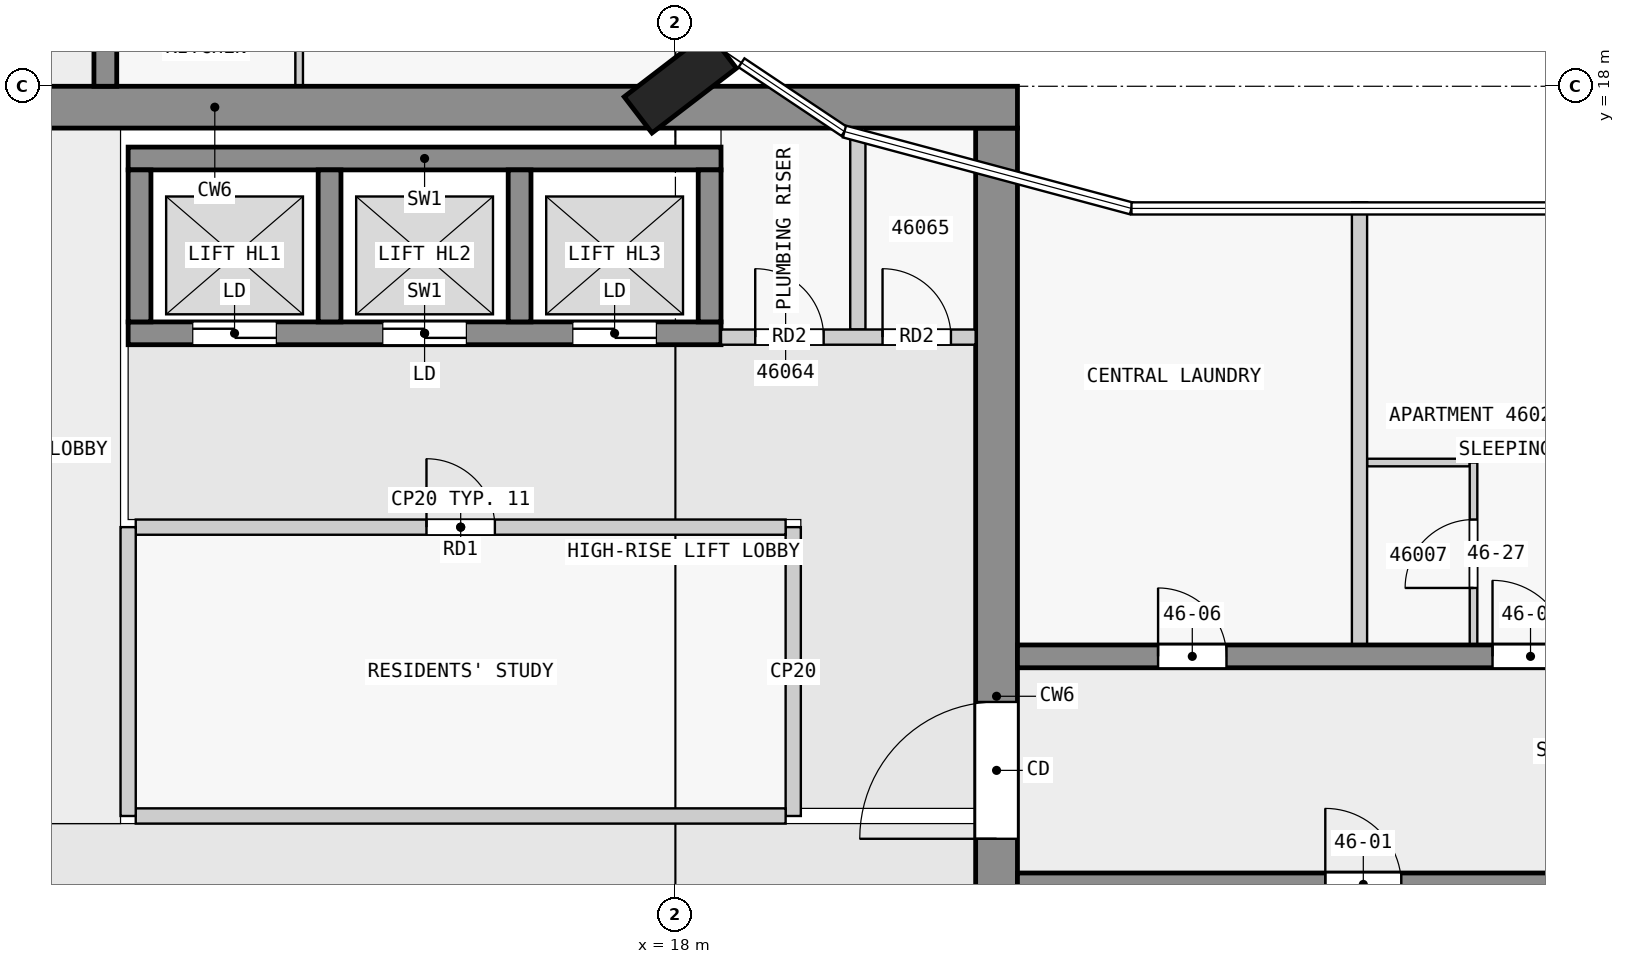
"""IFC4 building model, lengths in metres.
Left out: names, types, materials, properties, quantities, classifications, styles, units other than length and angle.
Written with IfcOpenShell. Run it as: python <this file> out.ifc"""

import sys

from ifc_helpers import new_model, si_unit, direction, frame, frame_2d, origin, origin_2d, place, context, subcontext, project, spatial, rectangle, extrude, element, fill, save


model = new_model("IFC4")
c1 = context("Model", 3, precision=1e-05, world=origin(), true_north=direction((0.0, 1.0)))
c2 = subcontext(c1, "Body", "Model", "MODEL_VIEW")
j1 = project(units=[si_unit("LENGTHUNIT", "METRE"), si_unit("PLANEANGLEUNIT", "RADIAN")], contexts=[c1])
p1 = place(None, origin())
s1 = spatial("IfcSite", under=j1, at=p1, CompositionType="ELEMENT")
p2 = place(p1, origin())
s2 = spatial("IfcBuilding", under=s1, at=p2, CompositionType="ELEMENT")
p3 = place(p2, frame((0.0, 0.0, 177.9)))
s3 = spatial("IfcBuildingStorey", under=s2, at=p3, CompositionType="ELEMENT", Elevation=177.9)
p4 = place(p3, frame((18.065, 18.05, 0.0), z_axis=(0.0, 0.0, 1.0), x_axis=(-0.608810846443, 0.793315418515, 0.0)))
e1 = element("IfcColumn", 1, at=p4, inside=s3, PredefinedType="COLUMN", context=c2, shape_type="SweptSolid", body=[
    extrude(rectangle(XDim=0.6, YDim=1.4, at=origin_2d()), origin(), (0.0, 0.0, 1.0), 3.5),
])
p5 = place(p3, frame((1.38, 17.725, 0.0), z_axis=(0.0, 0.0, 1.0), x_axis=(1.0, 0.0, 0.0)))
e2 = element("IfcWall", 2, at=p5, inside=s3, PredefinedType="SHEAR", context=c2, shape_type="SweptSolid", body=[
    extrude(rectangle(XDim=21.12, YDim=0.55, at=frame_2d((10.56, 0.0))), origin(), (0.0, 0.0, 1.0), 3.25),
])
p6 = place(p5, frame((6.35, 0.0, 0.0)))
e3 = element("IfcOpeningElement", 3, at=p6, cuts=e2, PredefinedType="OPENING", context=c2, shape_type="SweptSolid", body=[
    extrude(rectangle(XDim=1.8, YDim=2.1, at=frame_2d((0.9, 1.05))), frame((0.0, 0.285, 0.0), z_axis=(0.0, -1.0, 0.0), x_axis=(1.0, 0.0, 0.0)), (0.0, 0.0, 1.0), 0.57),
])
p7 = place(p3, frame((22.225, 2.5, 0.0), z_axis=(0.0, 0.0, 1.0), x_axis=(0.0, 1.0, 0.0)))
e4 = element("IfcWall", 4, at=p7, inside=s3, PredefinedType="SHEAR", context=c2, shape_type="SweptSolid", body=[
    extrude(rectangle(XDim=14.95, YDim=0.55, at=frame_2d((7.475, 0.0))), origin(), (0.0, 0.0, 1.0), 3.25),
])
p8 = place(p7, frame((5.6, 0.0, 0.0)))
e5 = element("IfcOpeningElement", 5, at=p8, cuts=e4, PredefinedType="OPENING", context=c2, shape_type="SweptSolid", body=[
    extrude(rectangle(XDim=1.8, YDim=2.1, at=frame_2d((0.9, 1.05))), frame((0.0, 0.285, 0.0), z_axis=(0.0, -1.0, 0.0), x_axis=(1.0, 0.0, 0.0)), (0.0, 0.0, 1.0), 0.57),
])
p9 = place(p3, frame((10.8, 17.05, 0.0), z_axis=(0.0, 0.0, 1.0), x_axis=(1.0, 0.0, 0.0)))
e6 = element("IfcWall", 6, at=p9, inside=s3, PredefinedType="SHEAR", context=c2, shape_type="SweptSolid", body=[
    extrude(rectangle(XDim=7.8, YDim=0.3, at=frame_2d((3.9, 0.0))), origin(), (0.0, 0.0, 1.0), 3.25),
])
p10 = place(p3, frame((10.8, 14.75, 0.0), z_axis=(0.0, 0.0, 1.0), x_axis=(1.0, 0.0, 0.0)))
e7 = element("IfcWall", 7, at=p10, inside=s3, PredefinedType="SHEAR", context=c2, shape_type="SweptSolid", body=[
    extrude(rectangle(XDim=7.8, YDim=0.3, at=frame_2d((3.9, 0.0))), origin(), (0.0, 0.0, 1.0), 3.25),
])
p11 = place(p10, frame((0.85, 0.0, 0.0)))
e8 = element("IfcOpeningElement", 8, at=p11, cuts=e7, PredefinedType="OPENING", context=c2, shape_type="SweptSolid", body=[
    extrude(rectangle(XDim=1.1, YDim=2.1, at=frame_2d((0.55, 1.05))), frame((0.0, 0.16, 0.0), z_axis=(0.0, -1.0, 0.0), x_axis=(1.0, 0.0, 0.0)), (0.0, 0.0, 1.0), 0.32),
])
p12 = place(p10, frame((3.35, 0.0, 0.0)))
e9 = element("IfcOpeningElement", 9, at=p12, cuts=e7, PredefinedType="OPENING", context=c2, shape_type="SweptSolid", body=[
    extrude(rectangle(XDim=1.1, YDim=2.1, at=frame_2d((0.55, 1.05))), frame((0.0, 0.16, 0.0), z_axis=(0.0, -1.0, 0.0), x_axis=(1.0, 0.0, 0.0)), (0.0, 0.0, 1.0), 0.32),
])
p13 = place(p10, frame((5.85, 0.0, 0.0)))
e10 = element("IfcOpeningElement", 10, at=p13, cuts=e7, PredefinedType="OPENING", context=c2, shape_type="SweptSolid", body=[
    extrude(rectangle(XDim=1.1, YDim=2.1, at=frame_2d((0.55, 1.05))), frame((0.0, 0.16, 0.0), z_axis=(0.0, -1.0, 0.0), x_axis=(1.0, 0.0, 0.0)), (0.0, 0.0, 1.0), 0.32),
])
for number, where, z_axis, x_axis in (
    (11, (10.95, 14.9, 0.0), (0.0, 0.0, 1.0), (0.0, 1.0, 0.0)),
    (12, (13.45, 14.9, 0.0), (0.0, 0.0, 1.0), (0.0, 1.0, 0.0)),
    (13, (15.95, 14.9, 0.0), (0.0, 0.0, 1.0), (0.0, 1.0, 0.0)),
    (14, (18.45, 14.9, 0.0), (0.0, 0.0, 1.0), (0.0, 1.0, 0.0)),
):
    element("IfcWall", number, at=place(p3, frame(where, z_axis=z_axis, x_axis=x_axis)), inside=s3, PredefinedType="SHEAR", context=c2, shape_type="SweptSolid", body=[
        extrude(rectangle(XDim=2.0, YDim=0.3, at=frame_2d((1.0, 0.0))), origin(), (0.0, 0.0, 1.0), 3.25),
    ])
p14 = place(p3, frame((22.5, 7.5, 0.0), z_axis=(0.0, 0.0, 1.0), x_axis=(1.0, 0.0, 0.0)))
e15 = element("IfcWall", 15, at=p14, inside=s3, PredefinedType="SHEAR", context=c2, shape_type="SweptSolid", body=[
    extrude(rectangle(XDim=22.5, YDim=0.3, at=frame_2d((11.25, 0.0))), origin(), (0.0, 0.0, 1.0), 3.25),
])
p15 = place(p14, frame((4.05, 0.0, 0.0)))
e16 = element("IfcOpeningElement", 16, at=p15, cuts=e15, PredefinedType="OPENING", context=c2, shape_type="SweptSolid", body=[
    extrude(rectangle(XDim=1.0, YDim=2.1, at=frame_2d((0.5, 1.05))), frame((0.0, 0.16, 0.0), z_axis=(0.0, -1.0, 0.0), x_axis=(1.0, 0.0, 0.0)), (0.0, 0.0, 1.0), 0.32),
])
p16 = place(p14, frame((10.75, 0.0, 0.0)))
e17 = element("IfcOpeningElement", 17, at=p16, cuts=e15, PredefinedType="OPENING", context=c2, shape_type="SweptSolid", body=[
    extrude(rectangle(XDim=1.0, YDim=2.1, at=frame_2d((0.5, 1.05))), frame((0.0, 0.16, 0.0), z_axis=(0.0, -1.0, 0.0), x_axis=(1.0, 0.0, 0.0)), (0.0, 0.0, 1.0), 0.32),
])
p17 = place(p14, frame((15.35, 0.0, 0.0)))
e18 = element("IfcOpeningElement", 18, at=p17, cuts=e15, PredefinedType="OPENING", context=c2, shape_type="SweptSolid", body=[
    extrude(rectangle(XDim=0.9, YDim=2.1, at=frame_2d((0.45, 1.05))), frame((0.0, 0.16, 0.0), z_axis=(0.0, -1.0, 0.0), x_axis=(1.0, 0.0, 0.0)), (0.0, 0.0, 1.0), 0.32),
])
p18 = place(p14, frame((18.75, 0.0, 0.0)))
e19 = element("IfcOpeningElement", 19, at=p18, cuts=e15, PredefinedType="OPENING", context=c2, shape_type="SweptSolid", body=[
    extrude(rectangle(XDim=0.9, YDim=2.1, at=frame_2d((0.45, 1.05))), frame((0.0, 0.16, 0.0), z_axis=(0.0, -1.0, 0.0), x_axis=(1.0, 0.0, 0.0)), (0.0, 0.0, 1.0), 0.32),
])
p19 = place(p14, frame((20.95, 0.0, 0.0)))
e20 = element("IfcOpeningElement", 20, at=p19, cuts=e15, PredefinedType="OPENING", context=c2, shape_type="SweptSolid", body=[
    extrude(rectangle(XDim=1.0, YDim=2.1, at=frame_2d((0.5, 1.05))), frame((0.0, 0.16, 0.0), z_axis=(0.0, -1.0, 0.0), x_axis=(1.0, 0.0, 0.0)), (0.0, 0.0, 1.0), 0.32),
])
p20 = place(p3, frame((22.5, 10.5, 0.0), z_axis=(0.0, 0.0, 1.0), x_axis=(1.0, 0.0, 0.0)))
e21 = element("IfcWall", 21, at=p20, inside=s3, PredefinedType="SHEAR", context=c2, shape_type="SweptSolid", body=[
    extrude(rectangle(XDim=22.5, YDim=0.3, at=frame_2d((11.25, 0.0))), origin(), (0.0, 0.0, 1.0), 3.25),
])
p21 = place(p20, frame((1.85, 0.0, 0.0)))
e22 = element("IfcOpeningElement", 22, at=p21, cuts=e21, PredefinedType="OPENING", context=c2, shape_type="SweptSolid", body=[
    extrude(rectangle(XDim=0.9, YDim=2.1, at=frame_2d((0.45, 1.05))), frame((0.0, 0.16, 0.0), z_axis=(0.0, -1.0, 0.0), x_axis=(1.0, 0.0, 0.0)), (0.0, 0.0, 1.0), 0.32),
])
p22 = place(p20, frame((6.25, 0.0, 0.0)))
e23 = element("IfcOpeningElement", 23, at=p22, cuts=e21, PredefinedType="OPENING", context=c2, shape_type="SweptSolid", body=[
    extrude(rectangle(XDim=1.0, YDim=2.1, at=frame_2d((0.5, 1.05))), frame((0.0, 0.16, 0.0), z_axis=(0.0, -1.0, 0.0), x_axis=(1.0, 0.0, 0.0)), (0.0, 0.0, 1.0), 0.32),
])
p23 = place(p20, frame((10.35, 0.0, 0.0)))
e24 = element("IfcOpeningElement", 24, at=p23, cuts=e21, PredefinedType="OPENING", context=c2, shape_type="SweptSolid", body=[
    extrude(rectangle(XDim=1.8, YDim=2.1, at=frame_2d((0.9, 1.05))), frame((0.0, 0.16, 0.0), z_axis=(0.0, -1.0, 0.0), x_axis=(1.0, 0.0, 0.0)), (0.0, 0.0, 1.0), 0.32),
])
p24 = place(p20, frame((16.85, 0.0, 0.0)))
e25 = element("IfcOpeningElement", 25, at=p24, cuts=e21, PredefinedType="OPENING", context=c2, shape_type="SweptSolid", body=[
    extrude(rectangle(XDim=1.0, YDim=2.1, at=frame_2d((0.5, 1.05))), frame((0.0, 0.16, 0.0), z_axis=(0.0, -1.0, 0.0), x_axis=(1.0, 0.0, 0.0)), (0.0, 0.0, 1.0), 0.32),
])
p25 = place(p3, frame((10.5, 18.0, 0.0), z_axis=(0.0, 0.0, 1.0), x_axis=(0.0, 1.0, 0.0)))
e26 = element("IfcWall", 26, at=p25, inside=s3, PredefinedType="SHEAR", context=c2, shape_type="SweptSolid", body=[
    extrude(rectangle(XDim=27.0, YDim=0.3, at=frame_2d((13.5, 0.0))), origin(), (0.0, 0.0, 1.0), 3.25),
])
p26 = place(p25, frame((1.75, 0.0, 0.0)))
e27 = element("IfcOpeningElement", 27, at=p26, cuts=e26, PredefinedType="OPENING", context=c2, shape_type="SweptSolid", body=[
    extrude(rectangle(XDim=1.0, YDim=2.1, at=frame_2d((0.5, 1.05))), frame((0.0, 0.16, 0.0), z_axis=(0.0, -1.0, 0.0), x_axis=(1.0, 0.0, 0.0)), (0.0, 0.0, 1.0), 0.32),
])
p27 = place(p25, frame((6.25, 0.0, 0.0)))
e28 = element("IfcOpeningElement", 28, at=p27, cuts=e26, PredefinedType="OPENING", context=c2, shape_type="SweptSolid", body=[
    extrude(rectangle(XDim=1.0, YDim=2.1, at=frame_2d((0.5, 1.05))), frame((0.0, 0.16, 0.0), z_axis=(0.0, -1.0, 0.0), x_axis=(1.0, 0.0, 0.0)), (0.0, 0.0, 1.0), 0.32),
])
p28 = place(p25, frame((10.75, 0.0, 0.0)))
e29 = element("IfcOpeningElement", 29, at=p28, cuts=e26, PredefinedType="OPENING", context=c2, shape_type="SweptSolid", body=[
    extrude(rectangle(XDim=1.0, YDim=2.1, at=frame_2d((0.5, 1.05))), frame((0.0, 0.16, 0.0), z_axis=(0.0, -1.0, 0.0), x_axis=(1.0, 0.0, 0.0)), (0.0, 0.0, 1.0), 0.32),
])
p29 = place(p25, frame((15.25, 0.0, 0.0)))
e30 = element("IfcOpeningElement", 30, at=p29, cuts=e26, PredefinedType="OPENING", context=c2, shape_type="SweptSolid", body=[
    extrude(rectangle(XDim=1.0, YDim=2.1, at=frame_2d((0.5, 1.05))), frame((0.0, 0.16, 0.0), z_axis=(0.0, -1.0, 0.0), x_axis=(1.0, 0.0, 0.0)), (0.0, 0.0, 1.0), 0.32),
])
p30 = place(p25, frame((19.75, 0.0, 0.0)))
e31 = element("IfcOpeningElement", 31, at=p30, cuts=e26, PredefinedType="OPENING", context=c2, shape_type="SweptSolid", body=[
    extrude(rectangle(XDim=1.0, YDim=2.1, at=frame_2d((0.5, 1.05))), frame((0.0, 0.16, 0.0), z_axis=(0.0, -1.0, 0.0), x_axis=(1.0, 0.0, 0.0)), (0.0, 0.0, 1.0), 0.32),
])
p31 = place(p25, frame((23.25, 0.0, 0.0)))
e32 = element("IfcOpeningElement", 32, at=p31, cuts=e26, PredefinedType="OPENING", context=c2, shape_type="SweptSolid", body=[
    extrude(rectangle(XDim=0.9, YDim=2.1, at=frame_2d((0.45, 1.05))), frame((0.0, 0.16, 0.0), z_axis=(0.0, -1.0, 0.0), x_axis=(1.0, 0.0, 0.0)), (0.0, 0.0, 1.0), 0.32),
])
p32 = place(p25, frame((25.45, 0.0, 0.0)))
e33 = element("IfcOpeningElement", 33, at=p32, cuts=e26, PredefinedType="OPENING", context=c2, shape_type="SweptSolid", body=[
    extrude(rectangle(XDim=1.0, YDim=2.1, at=frame_2d((0.5, 1.05))), frame((0.0, 0.16, 0.0), z_axis=(0.0, -1.0, 0.0), x_axis=(1.0, 0.0, 0.0)), (0.0, 0.0, 1.0), 0.32),
])
p33 = place(p3, frame((10.8, 8.4, 0.0), z_axis=(0.0, 0.0, 1.0), x_axis=(0.0, 1.0, 0.0)))
e34 = element("IfcWall", 34, at=p33, inside=s3, PredefinedType="PARTITIONING", context=c2, shape_type="SweptSolid", body=[
    extrude(rectangle(XDim=3.8, YDim=0.2, at=frame_2d((1.9, 0.0))), origin(), (0.0, 0.0, 1.0), 3.25),
])
p34 = place(p3, frame((10.9, 8.4, 0.0), z_axis=(0.0, 0.0, 1.0), x_axis=(1.0, 0.0, 0.0)))
e35 = element("IfcWall", 35, at=p34, inside=s3, PredefinedType="PARTITIONING", context=c2, shape_type="SweptSolid", body=[
    extrude(rectangle(XDim=8.55, YDim=0.2, at=frame_2d((4.275, 0.0))), origin(), (0.0, 0.0, 1.0), 3.25),
])
p35 = place(p3, frame((19.55, 8.4, 0.0), z_axis=(0.0, 0.0, 1.0), x_axis=(0.0, 1.0, 0.0)))
e36 = element("IfcWall", 36, at=p35, inside=s3, PredefinedType="PARTITIONING", context=c2, shape_type="SweptSolid", body=[
    extrude(rectangle(XDim=3.8, YDim=0.2, at=frame_2d((1.9, 0.0))), origin(), (0.0, 0.0, 1.0), 3.25),
])
p36 = place(p3, frame((10.9, 12.2, 0.0), z_axis=(0.0, 0.0, 1.0), x_axis=(1.0, 0.0, 0.0)))
e37 = element("IfcWall", 37, at=p36, inside=s3, PredefinedType="PARTITIONING", context=c2, shape_type="SweptSolid", body=[
    extrude(rectangle(XDim=8.55, YDim=0.2, at=frame_2d((4.275, 0.0))), origin(), (0.0, 0.0, 1.0), 3.25),
])
p37 = place(p36, frame((3.825, 0.0, 0.0)))
e38 = element("IfcOpeningElement", 38, at=p37, cuts=e37, PredefinedType="OPENING", context=c2, shape_type="SweptSolid", body=[
    extrude(rectangle(XDim=0.9, YDim=2.1, at=frame_2d((0.45, 1.05))), frame((0.0, 0.11, 0.0), z_axis=(0.0, -1.0, 0.0), x_axis=(1.0, 0.0, 0.0)), (0.0, 0.0, 1.0), 0.22),
])
p38 = place(p3, frame((18.6, 14.7, 0.0), z_axis=(0.0, 0.0, 1.0), x_axis=(1.0, 0.0, 0.0)))
e39 = element("IfcWall", 39, at=p38, inside=s3, PredefinedType="PARTITIONING", context=c2, shape_type="SweptSolid", body=[
    extrude(rectangle(XDim=3.35, YDim=0.2, at=frame_2d((1.675, 0.0))), origin(), (0.0, 0.0, 1.0), 3.25),
])
p39 = place(p38, frame((0.45, 0.0, 0.0)))
e40 = element("IfcOpeningElement", 40, at=p39, cuts=e39, PredefinedType="OPENING", context=c2, shape_type="SweptSolid", body=[
    extrude(rectangle(XDim=0.9, YDim=2.1, at=frame_2d((0.45, 1.05))), frame((0.0, 0.11, 0.0), z_axis=(0.0, -1.0, 0.0), x_axis=(1.0, 0.0, 0.0)), (0.0, 0.0, 1.0), 0.22),
])
p40 = place(p38, frame((2.125, 0.0, 0.0)))
e41 = element("IfcOpeningElement", 41, at=p40, cuts=e39, PredefinedType="OPENING", context=c2, shape_type="SweptSolid", body=[
    extrude(rectangle(XDim=0.9, YDim=2.1, at=frame_2d((0.45, 1.05))), frame((0.0, 0.11, 0.0), z_axis=(0.0, -1.0, 0.0), x_axis=(1.0, 0.0, 0.0)), (0.0, 0.0, 1.0), 0.22),
])
p41 = place(p3, frame((20.4, 14.8, 0.0), z_axis=(0.0, 0.0, 1.0), x_axis=(0.0, 1.0, 0.0)))
e42 = element("IfcWall", 42, at=p41, inside=s3, PredefinedType="PARTITIONING", context=c2, shape_type="SweptSolid", body=[
    extrude(rectangle(XDim=2.65, YDim=0.2, at=frame_2d((1.325, 0.0))), origin(), (0.0, 0.0, 1.0), 3.25),
])
p42 = place(p3, frame((28.45, 13.05, 0.0), z_axis=(0.0, 0.0, 1.0), x_axis=(-1.0, 0.0, 0.0)))
e43 = element("IfcWall", 43, at=p42, inside=s3, PredefinedType="PARTITIONING", context=c2, shape_type="SweptSolid", body=[
    extrude(rectangle(XDim=1.35, YDim=0.1, at=frame_2d((0.675, 0.0))), origin(), (0.0, 0.0, 1.0), 3.25),
])
p43 = place(p3, frame((13.05, 18.0, 0.0), z_axis=(0.0, 0.0, 1.0), x_axis=(0.0, 1.0, 0.0)))
e44 = element("IfcWall", 44, at=p43, inside=s3, PredefinedType="PARTITIONING", context=c2, shape_type="SweptSolid", body=[
    extrude(rectangle(XDim=1.45, YDim=0.1, at=frame_2d((0.725, 0.0))), origin(), (0.0, 0.0, 1.0), 3.25),
])
p44 = place(p3, frame((27.0, 10.65, 0.0), z_axis=(0.0, 0.0, 1.0), x_axis=(0.0, 1.0, 0.0)))
e45 = element("IfcWall", 45, at=p44, inside=s3, PredefinedType="PARTITIONING", context=c2, shape_type="SweptSolid", body=[
    extrude(rectangle(XDim=5.823, YDim=0.2, at=frame_2d((2.912, 0.0))), origin(), (0.0, 0.0, 1.0), 3.25),
])
p45 = place(p3, frame((28.5, 10.65, 0.0), z_axis=(0.0, 0.0, 1.0), x_axis=(0.0, 1.0, 0.0)))
e46 = element("IfcWall", 46, at=p45, inside=s3, PredefinedType="PARTITIONING", context=c2, shape_type="SweptSolid", body=[
    extrude(rectangle(XDim=2.4, YDim=0.1, at=frame_2d((1.2, 0.0))), origin(), (0.0, 0.0, 1.0), 3.25),
])
p46 = place(p45, frame((0.75, 0.0, 0.0)))
e47 = element("IfcOpeningElement", 47, at=p46, cuts=e46, PredefinedType="OPENING", context=c2, shape_type="SweptSolid", body=[
    extrude(rectangle(XDim=0.9, YDim=2.1, at=frame_2d((0.45, 1.05))), frame((0.0, 0.06, 0.0), z_axis=(0.0, -1.0, 0.0), x_axis=(1.0, 0.0, 0.0)), (0.0, 0.0, 1.0), 0.12),
])
p47 = place(p37, origin())
e48 = element("IfcDoor", 48, at=p47, inside=s3, OperationType="SINGLE_SWING_LEFT", PredefinedType="DOOR", context=c2, shape_type="SweptSolid", body=[
    extrude(rectangle(XDim=0.9, YDim=2.1, at=frame_2d((0.45, 1.05))), frame((0.0, 0.025, 0.0), z_axis=(0.0, -1.0, 0.0), x_axis=(1.0, 0.0, 0.0)), (0.0, 0.0, 1.0), 0.05),
])
fill(e38, e48)
p48 = place(p11, origin())
e49 = element("IfcDoor", 49, at=p48, inside=s3, OperationType="DOUBLE_DOOR_SLIDING", PredefinedType="DOOR", context=c2, shape_type="SweptSolid", body=[
    extrude(rectangle(XDim=1.1, YDim=2.1, at=frame_2d((0.55, 1.05))), frame((0.0, 0.025, 0.0), z_axis=(0.0, -1.0, 0.0), x_axis=(1.0, 0.0, 0.0)), (0.0, 0.0, 1.0), 0.05),
])
fill(e8, e49)
p49 = place(p12, origin())
e50 = element("IfcDoor", 50, at=p49, inside=s3, OperationType="DOUBLE_DOOR_SLIDING", PredefinedType="DOOR", context=c2, shape_type="SweptSolid", body=[
    extrude(rectangle(XDim=1.1, YDim=2.1, at=frame_2d((0.55, 1.05))), frame((0.0, 0.025, 0.0), z_axis=(0.0, -1.0, 0.0), x_axis=(1.0, 0.0, 0.0)), (0.0, 0.0, 1.0), 0.05),
])
fill(e9, e50)
p50 = place(p13, origin())
e51 = element("IfcDoor", 51, at=p50, inside=s3, OperationType="DOUBLE_DOOR_SLIDING", PredefinedType="DOOR", context=c2, shape_type="SweptSolid", body=[
    extrude(rectangle(XDim=1.1, YDim=2.1, at=frame_2d((0.55, 1.05))), frame((0.0, 0.025, 0.0), z_axis=(0.0, -1.0, 0.0), x_axis=(1.0, 0.0, 0.0)), (0.0, 0.0, 1.0), 0.05),
])
fill(e10, e51)
p51 = place(p8, origin())
e52 = element("IfcDoor", 52, at=p51, inside=s3, OperationType="DOUBLE_DOOR_SINGLE_SWING", PredefinedType="DOOR", context=c2, shape_type="SweptSolid", body=[
    extrude(rectangle(XDim=1.8, YDim=2.1, at=frame_2d((0.9, 1.05))), frame((0.0, 0.025, 0.0), z_axis=(0.0, -1.0, 0.0), x_axis=(1.0, 0.0, 0.0)), (0.0, 0.0, 1.0), 0.05),
])
fill(e5, e52)
p52 = place(p39, origin())
e53 = element("IfcDoor", 53, at=p52, inside=s3, OperationType="SINGLE_SWING_LEFT", PredefinedType="DOOR", context=c2, shape_type="SweptSolid", body=[
    extrude(rectangle(XDim=0.9, YDim=2.1, at=frame_2d((0.45, 1.05))), frame((0.0, 0.025, 0.0), z_axis=(0.0, -1.0, 0.0), x_axis=(1.0, 0.0, 0.0)), (0.0, 0.0, 1.0), 0.05),
])
fill(e40, e53)
p53 = place(p40, origin())
e54 = element("IfcDoor", 54, at=p53, inside=s3, OperationType="SINGLE_SWING_LEFT", PredefinedType="DOOR", context=c2, shape_type="SweptSolid", body=[
    extrude(rectangle(XDim=0.9, YDim=2.1, at=frame_2d((0.45, 1.05))), frame((0.0, 0.025, 0.0), z_axis=(0.0, -1.0, 0.0), x_axis=(1.0, 0.0, 0.0)), (0.0, 0.0, 1.0), 0.05),
])
fill(e41, e54)
p54 = place(p15, origin())
e55 = element("IfcDoor", 55, at=p54, inside=s3, OperationType="SINGLE_SWING_LEFT", PredefinedType="DOOR", context=c2, shape_type="SweptSolid", body=[
    extrude(rectangle(XDim=1.0, YDim=2.1, at=frame_2d((0.5, 1.05))), frame((0.0, 0.025, 0.0), z_axis=(0.0, -1.0, 0.0), x_axis=(1.0, 0.0, 0.0)), (0.0, 0.0, 1.0), 0.05),
])
fill(e16, e55)
p55 = place(p21, origin())
e56 = element("IfcDoor", 56, at=p55, inside=s3, OperationType="SINGLE_SWING_LEFT", PredefinedType="DOOR", context=c2, shape_type="SweptSolid", body=[
    extrude(rectangle(XDim=0.9, YDim=2.1, at=frame_2d((0.45, 1.05))), frame((0.0, 0.025, 0.0), z_axis=(0.0, -1.0, 0.0), x_axis=(1.0, 0.0, 0.0)), (0.0, 0.0, 1.0), 0.05),
])
fill(e22, e56)
p56 = place(p22, origin())
e57 = element("IfcDoor", 57, at=p56, inside=s3, OperationType="SINGLE_SWING_LEFT", PredefinedType="DOOR", context=c2, shape_type="SweptSolid", body=[
    extrude(rectangle(XDim=1.0, YDim=2.1, at=frame_2d((0.5, 1.05))), frame((0.0, 0.025, 0.0), z_axis=(0.0, -1.0, 0.0), x_axis=(1.0, 0.0, 0.0)), (0.0, 0.0, 1.0), 0.05),
])
fill(e23, e57)
p57 = place(p46, origin())
e58 = element("IfcDoor", 58, at=p57, inside=s3, OperationType="SINGLE_SWING_LEFT", PredefinedType="DOOR", context=c2, shape_type="SweptSolid", body=[
    extrude(rectangle(XDim=0.9, YDim=2.1, at=frame_2d((0.45, 1.05))), frame((0.0, 0.025, 0.0), z_axis=(0.0, -1.0, 0.0), x_axis=(1.0, 0.0, 0.0)), (0.0, 0.0, 1.0), 0.05),
])
fill(e47, e58)
save(model, sys.argv[1])
